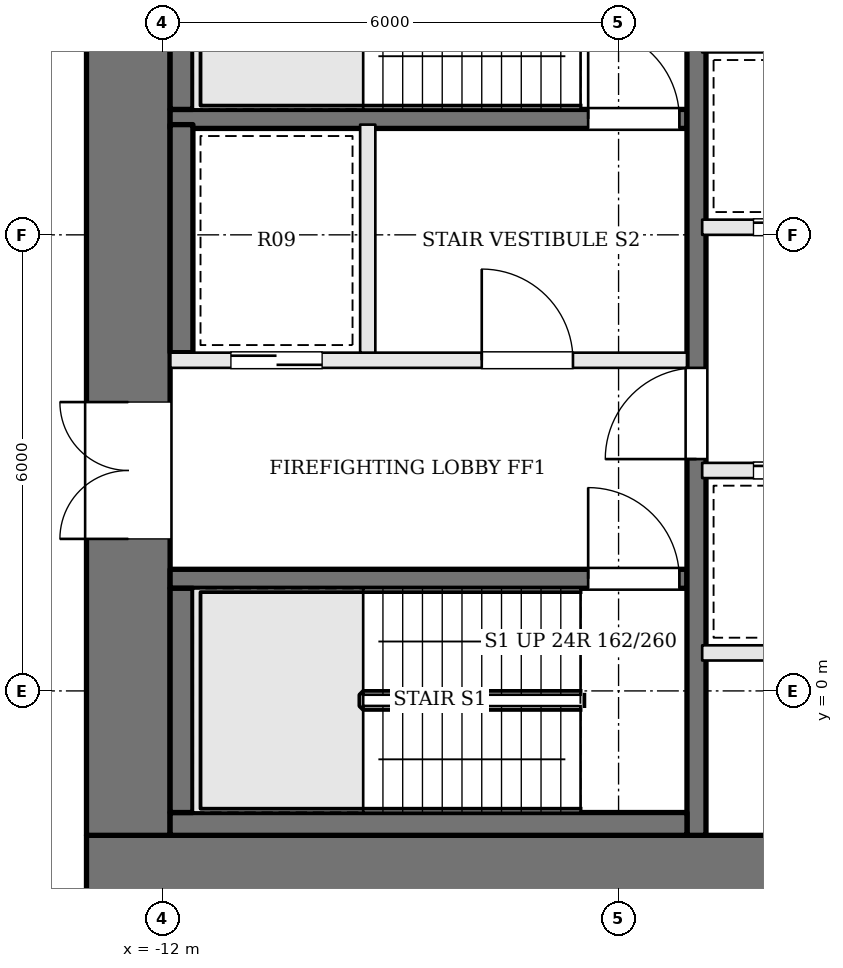
"""IFC4 building model, lengths in metres.
Left out: names, types, materials, properties, quantities, classifications, styles, units other than length and angle.
Written with IfcOpenShell. Run it as: python <this file> out.ifc"""

import sys

from ifc_helpers import new_model, si_unit, direction, frame, frame_2d, origin, place, context, subcontext, project, spatial, rectangle, extrude, element, fill, save


model = new_model("IFC4")
c1 = context("Model", 3, precision=1e-05, world=origin(), true_north=direction((0.0, 1.0)))
c2 = subcontext(c1, "Body", "Model", "MODEL_VIEW")
j1 = project(units=[si_unit("LENGTHUNIT", "METRE"), si_unit("PLANEANGLEUNIT", "RADIAN")], contexts=[c1])
p1 = place(None, origin())
s1 = spatial("IfcSite", under=j1, at=p1, CompositionType="ELEMENT")
p2 = place(p1, origin())
s2 = spatial("IfcBuilding", under=s1, at=p2, CompositionType="ELEMENT")
p3 = place(p2, frame((0.0, 0.0, 161.7)))
s3 = spatial("IfcBuildingStorey", under=s2, at=p3, CompositionType="ELEMENT", Elevation=161.7)
p4 = place(p3, frame((-13.0, -2.45, 0.0), z_axis=(0.0, 0.0, 1.0), x_axis=(1.0, 0.0, 0.0)))
e1 = element("IfcWall", 1, at=p4, inside=s3, PredefinedType="SHEAR", context=c2, shape_type="SweptSolid", body=[
    extrude(rectangle(XDim=26.0, YDim=1.1, at=frame_2d((13.0, 0.0))), origin(), (0.0, 0.0, 1.0), 3.9),
])
p5 = place(p4, frame((9.275, 0.0, 0.0)))
e2 = element("IfcOpeningElement", 2, at=p5, cuts=e1, PredefinedType="OPENING", context=c2, shape_type="SweptSolid", body=[
    extrude(rectangle(XDim=0.9, YDim=2.1, at=frame_2d((0.45, 1.05))), frame((0.0, 0.56, 0.0), z_axis=(0.0, -1.0, 0.0), x_axis=(1.0, 0.0, 0.0)), (0.0, 0.0, 1.0), 1.12),
])
p6 = place(p4, frame((12.525, 0.0, 0.0)))
e3 = element("IfcOpeningElement", 3, at=p6, cuts=e1, PredefinedType="OPENING", context=c2, shape_type="SweptSolid", body=[
    extrude(rectangle(XDim=0.9, YDim=2.1, at=frame_2d((0.45, 1.05))), frame((0.0, 0.56, 0.0), z_axis=(0.0, -1.0, 0.0), x_axis=(1.0, 0.0, 0.0)), (0.0, 0.0, 1.0), 1.12),
])
p7 = place(p4, frame((15.0, 0.0, 0.0)))
e4 = element("IfcOpeningElement", 4, at=p7, cuts=e1, PredefinedType="OPENING", context=c2, shape_type="SweptSolid", body=[
    extrude(rectangle(XDim=1.0, YDim=2.1, at=frame_2d((0.5, 1.05))), frame((0.0, 0.56, 0.0), z_axis=(0.0, -1.0, 0.0), x_axis=(1.0, 0.0, 0.0)), (0.0, 0.0, 1.0), 1.12),
])
p8 = place(p4, frame((16.7, 0.0, 0.0)))
e5 = element("IfcOpeningElement", 5, at=p8, cuts=e1, PredefinedType="OPENING", context=c2, shape_type="SweptSolid", body=[
    extrude(rectangle(XDim=0.9, YDim=2.1, at=frame_2d((0.45, 1.05))), frame((0.0, 0.56, 0.0), z_axis=(0.0, -1.0, 0.0), x_axis=(1.0, 0.0, 0.0)), (0.0, 0.0, 1.0), 1.12),
])
p9 = place(p3, frame((-12.45, -1.9, 0.0), z_axis=(0.0, 0.0, 1.0), x_axis=(0.0, 1.0, 0.0)))
e6 = element("IfcWall", 6, at=p9, inside=s3, PredefinedType="SHEAR", context=c2, shape_type="SweptSolid", body=[
    extrude(rectangle(XDim=12.8, YDim=1.1, at=frame_2d((6.4, 0.0))), origin(), (0.0, 0.0, 1.0), 3.9),
])
p10 = place(p9, frame((3.9, 0.0, 0.0)))
e7 = element("IfcOpeningElement", 7, at=p10, cuts=e6, PredefinedType="OPENING", context=c2, shape_type="SweptSolid", body=[
    extrude(rectangle(XDim=1.8, YDim=2.1, at=frame_2d((0.9, 1.05))), frame((0.0, 0.56, 0.0), z_axis=(0.0, -1.0, 0.0), x_axis=(1.0, 0.0, 0.0)), (0.0, 0.0, 1.0), 1.12),
])
p11 = place(p3, frame((-11.9, 1.475, 0.0), z_axis=(0.0, 0.0, 1.0), x_axis=(1.0, 0.0, 0.0)))
e8 = element("IfcWall", 8, at=p11, inside=s3, PredefinedType="SOLIDWALL", context=c2, shape_type="SweptSolid", body=[
    extrude(rectangle(XDim=6.8, YDim=0.25, at=frame_2d((3.4, 0.0))), origin(), (0.0, 0.0, 1.0), 3.7),
])
p12 = place(p11, frame((5.5, 0.0, 0.0)))
e9 = element("IfcOpeningElement", 9, at=p12, cuts=e8, PredefinedType="OPENING", context=c2, shape_type="SweptSolid", body=[
    extrude(rectangle(XDim=1.2, YDim=2.1, at=frame_2d((0.6, 1.05))), frame((0.0, 0.135, 0.0), z_axis=(0.0, -1.0, 0.0), x_axis=(1.0, 0.0, 0.0)), (0.0, 0.0, 1.0), 0.27),
])
p13 = place(p3, frame((-11.9, 4.35, 0.0), z_axis=(0.0, 0.0, 1.0), x_axis=(1.0, 0.0, 0.0)))
e10 = element("IfcWall", 10, at=p13, inside=s3, PredefinedType="SOLIDWALL", context=c2, shape_type="SweptSolid", body=[
    extrude(rectangle(XDim=6.8, YDim=0.2, at=frame_2d((3.4, 0.0))), origin(), (0.0, 0.0, 1.0), 3.7),
])
p14 = place(p13, frame((4.1, 0.0, 0.0)))
e11 = element("IfcOpeningElement", 11, at=p14, cuts=e10, PredefinedType="OPENING", context=c2, shape_type="SweptSolid", body=[
    extrude(rectangle(XDim=1.2, YDim=2.1, at=frame_2d((0.6, 1.05))), frame((0.0, 0.11, 0.0), z_axis=(0.0, -1.0, 0.0), x_axis=(1.0, 0.0, 0.0)), (0.0, 0.0, 1.0), 0.22),
])
p15 = place(p13, frame((0.8, 0.0, 0.0)))
e12 = element("IfcOpeningElement", 12, at=p15, cuts=e10, PredefinedType="OPENING", context=c2, shape_type="SweptSolid", body=[
    extrude(rectangle(XDim=1.2, YDim=2.1, at=frame_2d((0.6, 1.05))), frame((0.0, 0.11, 0.0), z_axis=(0.0, -1.0, 0.0), x_axis=(1.0, 0.0, 0.0)), (0.0, 0.0, 1.0), 0.22),
])
p16 = place(p3, frame((-11.9, 7.525, 0.0), z_axis=(0.0, 0.0, 1.0), x_axis=(1.0, 0.0, 0.0)))
e13 = element("IfcWall", 13, at=p16, inside=s3, PredefinedType="SOLIDWALL", context=c2, shape_type="SweptSolid", body=[
    extrude(rectangle(XDim=6.8, YDim=0.25, at=frame_2d((3.4, 0.0))), origin(), (0.0, 0.0, 1.0), 3.7),
])
p17 = place(p16, frame((5.5, 0.0, 0.0)))
e14 = element("IfcOpeningElement", 14, at=p17, cuts=e13, PredefinedType="OPENING", context=c2, shape_type="SweptSolid", body=[
    extrude(rectangle(XDim=1.2, YDim=2.1, at=frame_2d((0.6, 1.05))), frame((0.0, 0.135, 0.0), z_axis=(0.0, -1.0, 0.0), x_axis=(1.0, 0.0, 0.0)), (0.0, 0.0, 1.0), 0.27),
])
p18 = place(p3, frame((-9.3, 4.45, 0.0), z_axis=(0.0, 0.0, 1.0), x_axis=(0.0, 1.0, 0.0)))
e15 = element("IfcWall", 15, at=p18, inside=s3, PredefinedType="SOLIDWALL", context=c2, shape_type="SweptSolid", body=[
    extrude(rectangle(XDim=3.0, YDim=0.2, at=frame_2d((1.5, 0.0))), origin(), (0.0, 0.0, 1.0), 3.7),
])
p19 = place(p3, frame((-4.975, -1.9, 0.0), z_axis=(0.0, 0.0, 1.0), x_axis=(0.0, 1.0, 0.0)))
e16 = element("IfcWall", 16, at=p19, inside=s3, PredefinedType="SOLIDWALL", context=c2, shape_type="SweptSolid", body=[
    extrude(rectangle(XDim=12.8, YDim=0.25, at=frame_2d((6.4, 0.0))), origin(), (0.0, 0.0, 1.0), 3.7),
])
p20 = place(p19, frame((4.95, 0.0, 0.0)))
e17 = element("IfcOpeningElement", 17, at=p20, cuts=e16, PredefinedType="OPENING", context=c2, shape_type="SweptSolid", body=[
    extrude(rectangle(XDim=1.2, YDim=2.1, at=frame_2d((0.6, 1.05))), frame((0.0, 0.135, 0.0), z_axis=(0.0, -1.0, 0.0), x_axis=(1.0, 0.0, 0.0)), (0.0, 0.0, 1.0), 0.27),
])
p21 = place(p3, frame((-11.9, -1.75, 0.0), z_axis=(0.0, 0.0, 1.0), x_axis=(1.0, 0.0, 0.0)))
e18 = element("IfcWall", 18, at=p21, inside=s3, PredefinedType="SOLIDWALL", context=c2, shape_type="SweptSolid", body=[
    extrude(rectangle(XDim=6.8, YDim=0.3, at=frame_2d((3.4, 0.0))), origin(), (0.0, 0.0, 1.0), 3.7),
])
p22 = place(p3, frame((-11.75, -1.6, 0.0), z_axis=(0.0, 0.0, 1.0), x_axis=(0.0, 1.0, 0.0)))
e19 = element("IfcWall", 19, at=p22, inside=s3, PredefinedType="SOLIDWALL", context=c2, shape_type="SweptSolid", body=[
    extrude(rectangle(XDim=2.95, YDim=0.3, at=frame_2d((1.475, 0.0))), origin(), (0.0, 0.0, 1.0), 3.7),
])
p23 = place(p3, frame((-11.75, 4.45, 0.0), z_axis=(0.0, 0.0, 1.0), x_axis=(0.0, 1.0, 0.0)))
e20 = element("IfcWall", 20, at=p23, inside=s3, PredefinedType="SOLIDWALL", context=c2, shape_type="SweptSolid", body=[
    extrude(rectangle(XDim=3.0, YDim=0.3, at=frame_2d((1.5, 0.0))), origin(), (0.0, 0.0, 1.0), 3.7),
])
p24 = place(p3, frame((-11.75, 7.65, 0.0), z_axis=(0.0, 0.0, 1.0), x_axis=(0.0, 1.0, 0.0)))
e21 = element("IfcWall", 21, at=p24, inside=s3, PredefinedType="SOLIDWALL", context=c2, shape_type="SweptSolid", body=[
    extrude(rectangle(XDim=2.95, YDim=0.3, at=frame_2d((1.475, 0.0))), origin(), (0.0, 0.0, 1.0), 3.7),
])
p25 = place(p3, frame((-4.9, 0.5, 0.0), z_axis=(0.0, 0.0, 1.0), x_axis=(1.0, 0.0, 0.0)))
e22 = element("IfcWall", 22, at=p25, inside=s3, PredefinedType="SOLIDWALL", context=c2, shape_type="SweptSolid", body=[
    extrude(rectangle(XDim=9.8, YDim=0.2, at=frame_2d((4.9, 0.0))), origin(), (0.0, 0.0, 1.0), 3.7),
])
p26 = place(p3, frame((-4.9, 2.9, 0.0), z_axis=(0.0, 0.0, 1.0), x_axis=(1.0, 0.0, 0.0)))
e23 = element("IfcWall", 23, at=p26, inside=s3, PredefinedType="SOLIDWALL", context=c2, shape_type="SweptSolid", body=[
    extrude(rectangle(XDim=9.8, YDim=0.2, at=frame_2d((4.9, 0.0))), origin(), (0.0, 0.0, 1.0), 3.7),
])
p27 = place(p26, frame((0.675, 0.0, 0.0)))
e24 = element("IfcOpeningElement", 24, at=p27, cuts=e23, PredefinedType="OPENING", context=c2, shape_type="SweptSolid", body=[
    extrude(rectangle(XDim=1.1, YDim=2.1, at=frame_2d((0.55, 1.05))), frame((0.0, 0.11, 0.0), z_axis=(0.0, -1.0, 0.0), x_axis=(1.0, 0.0, 0.0)), (0.0, 0.0, 1.0), 0.22),
])
p28 = place(p26, frame((2.613, 0.0, 0.0)))
e25 = element("IfcOpeningElement", 25, at=p28, cuts=e23, PredefinedType="OPENING", context=c2, shape_type="SweptSolid", body=[
    extrude(rectangle(XDim=0.9, YDim=2.1, at=frame_2d((0.45, 1.05))), frame((0.0, 0.11, 0.0), z_axis=(0.0, -1.0, 0.0), x_axis=(1.0, 0.0, 0.0)), (0.0, 0.0, 1.0), 0.22),
])
p29 = place(p26, frame((4.35, 0.0, 0.0)))
e26 = element("IfcOpeningElement", 26, at=p29, cuts=e23, PredefinedType="OPENING", context=c2, shape_type="SweptSolid", body=[
    extrude(rectangle(XDim=1.1, YDim=2.1, at=frame_2d((0.55, 1.05))), frame((0.0, 0.11, 0.0), z_axis=(0.0, -1.0, 0.0), x_axis=(1.0, 0.0, 0.0)), (0.0, 0.0, 1.0), 0.22),
])
p30 = place(p26, frame((7.463, 0.0, 0.0)))
e27 = element("IfcOpeningElement", 27, at=p30, cuts=e23, PredefinedType="OPENING", context=c2, shape_type="SweptSolid", body=[
    extrude(rectangle(XDim=1.0, YDim=2.1, at=frame_2d((0.5, 1.05))), frame((0.0, 0.11, 0.0), z_axis=(0.0, -1.0, 0.0), x_axis=(1.0, 0.0, 0.0)), (0.0, 0.0, 1.0), 0.22),
])
p31 = place(p3, frame((-4.9, 6.1, 0.0), z_axis=(0.0, 0.0, 1.0), x_axis=(1.0, 0.0, 0.0)))
e28 = element("IfcWall", 28, at=p31, inside=s3, PredefinedType="SOLIDWALL", context=c2, shape_type="SweptSolid", body=[
    extrude(rectangle(XDim=9.8, YDim=0.2, at=frame_2d((4.9, 0.0))), origin(), (0.0, 0.0, 1.0), 3.7),
])
p32 = place(p31, frame((0.675, 0.0, 0.0)))
e29 = element("IfcOpeningElement", 29, at=p32, cuts=e28, PredefinedType="OPENING", context=c2, shape_type="SweptSolid", body=[
    extrude(rectangle(XDim=1.1, YDim=2.1, at=frame_2d((0.55, 1.05))), frame((0.0, 0.11, 0.0), z_axis=(0.0, -1.0, 0.0), x_axis=(1.0, 0.0, 0.0)), (0.0, 0.0, 1.0), 0.22),
])
p33 = place(p31, frame((3.125, 0.0, 0.0)))
e30 = element("IfcOpeningElement", 30, at=p33, cuts=e28, PredefinedType="OPENING", context=c2, shape_type="SweptSolid", body=[
    extrude(rectangle(XDim=1.1, YDim=2.1, at=frame_2d((0.55, 1.05))), frame((0.0, 0.11, 0.0), z_axis=(0.0, -1.0, 0.0), x_axis=(1.0, 0.0, 0.0)), (0.0, 0.0, 1.0), 0.22),
])
p34 = place(p31, frame((5.575, 0.0, 0.0)))
e31 = element("IfcOpeningElement", 31, at=p34, cuts=e28, PredefinedType="OPENING", context=c2, shape_type="SweptSolid", body=[
    extrude(rectangle(XDim=1.1, YDim=2.1, at=frame_2d((0.55, 1.05))), frame((0.0, 0.11, 0.0), z_axis=(0.0, -1.0, 0.0), x_axis=(1.0, 0.0, 0.0)), (0.0, 0.0, 1.0), 0.22),
])
p35 = place(p31, frame((8.025, 0.0, 0.0)))
e32 = element("IfcOpeningElement", 32, at=p35, cuts=e28, PredefinedType="OPENING", context=c2, shape_type="SweptSolid", body=[
    extrude(rectangle(XDim=1.1, YDim=2.1, at=frame_2d((0.55, 1.05))), frame((0.0, 0.11, 0.0), z_axis=(0.0, -1.0, 0.0), x_axis=(1.0, 0.0, 0.0)), (0.0, 0.0, 1.0), 0.22),
])
p36 = place(p10, origin())
e33 = element("IfcDoor", 33, at=p36, inside=s3, OperationType="DOUBLE_DOOR_SINGLE_SWING", PredefinedType="DOOR", context=c2, shape_type="SweptSolid", body=[
    extrude(rectangle(XDim=1.8, YDim=2.1, at=frame_2d((0.9, 1.05))), frame((0.0, 0.025, 0.0), z_axis=(0.0, -1.0, 0.0), x_axis=(1.0, 0.0, 0.0)), (0.0, 0.0, 1.0), 0.05),
])
fill(e7, e33)
p37 = place(p20, origin())
e34 = element("IfcDoor", 34, at=p37, inside=s3, OperationType="SINGLE_SWING_LEFT", PredefinedType="DOOR", context=c2, shape_type="SweptSolid", body=[
    extrude(rectangle(XDim=1.2, YDim=2.1, at=frame_2d((0.6, 1.05))), frame((0.0, 0.025, 0.0), z_axis=(0.0, -1.0, 0.0), x_axis=(1.0, 0.0, 0.0)), (0.0, 0.0, 1.0), 0.05),
])
fill(e17, e34)
p38 = place(p14, origin())
e35 = element("IfcDoor", 35, at=p38, inside=s3, OperationType="SINGLE_SWING_LEFT", PredefinedType="DOOR", context=c2, shape_type="SweptSolid", body=[
    extrude(rectangle(XDim=1.2, YDim=2.1, at=frame_2d((0.6, 1.05))), frame((0.0, 0.025, 0.0), z_axis=(0.0, -1.0, 0.0), x_axis=(1.0, 0.0, 0.0)), (0.0, 0.0, 1.0), 0.05),
])
fill(e11, e35)
p39 = place(p12, origin())
e36 = element("IfcDoor", 36, at=p39, inside=s3, OperationType="SINGLE_SWING_LEFT", PredefinedType="DOOR", context=c2, shape_type="SweptSolid", body=[
    extrude(rectangle(XDim=1.2, YDim=2.1, at=frame_2d((0.6, 1.05))), frame((0.0, 0.025, 0.0), z_axis=(0.0, -1.0, 0.0), x_axis=(1.0, 0.0, 0.0)), (0.0, 0.0, 1.0), 0.05),
])
fill(e9, e36)
p40 = place(p17, origin())
e37 = element("IfcDoor", 37, at=p40, inside=s3, OperationType="SINGLE_SWING_LEFT", PredefinedType="DOOR", context=c2, shape_type="SweptSolid", body=[
    extrude(rectangle(XDim=1.2, YDim=2.1, at=frame_2d((0.6, 1.05))), frame((0.0, 0.025, 0.0), z_axis=(0.0, -1.0, 0.0), x_axis=(1.0, 0.0, 0.0)), (0.0, 0.0, 1.0), 0.05),
])
fill(e14, e37)
p41 = place(p15, origin())
e38 = element("IfcDoor", 38, at=p41, inside=s3, OperationType="SLIDING_TO_RIGHT", PredefinedType="DOOR", context=c2, shape_type="SweptSolid", body=[
    extrude(rectangle(XDim=1.2, YDim=2.1, at=frame_2d((0.6, 1.05))), frame((0.0, 0.025, 0.0), z_axis=(0.0, -1.0, 0.0), x_axis=(1.0, 0.0, 0.0)), (0.0, 0.0, 1.0), 0.05),
])
fill(e12, e38)
p42 = place(p27, origin())
e39 = element("IfcDoor", 39, at=p42, inside=s3, OperationType="SLIDING_TO_RIGHT", PredefinedType="DOOR", context=c2, shape_type="SweptSolid", body=[
    extrude(rectangle(XDim=1.1, YDim=2.1, at=frame_2d((0.55, 1.05))), frame((0.0, 0.025, 0.0), z_axis=(0.0, -1.0, 0.0), x_axis=(1.0, 0.0, 0.0)), (0.0, 0.0, 1.0), 0.05),
])
fill(e24, e39)
p43 = place(p32, origin())
e40 = element("IfcDoor", 40, at=p43, inside=s3, OperationType="SLIDING_TO_RIGHT", PredefinedType="DOOR", context=c2, shape_type="SweptSolid", body=[
    extrude(rectangle(XDim=1.1, YDim=2.1, at=frame_2d((0.55, 1.05))), frame((0.0, 0.025, 0.0), z_axis=(0.0, -1.0, 0.0), x_axis=(1.0, 0.0, 0.0)), (0.0, 0.0, 1.0), 0.05),
])
fill(e29, e40)
save(model, sys.argv[1])
